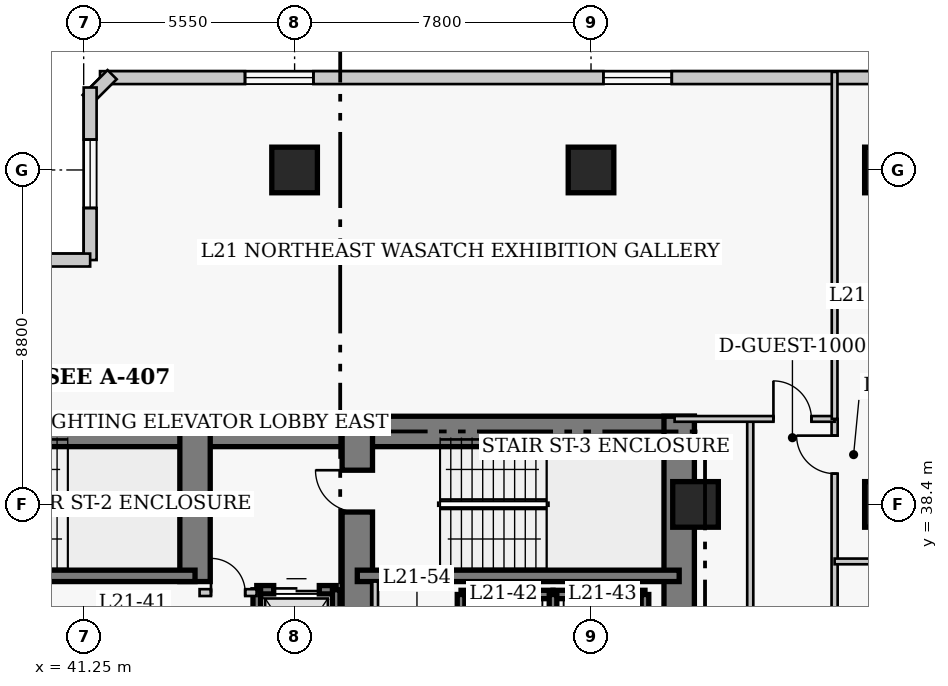
"""IFC4 building model, lengths in metres.
Left out: names, types, materials, properties, quantities, classifications, styles, units other than length and angle.
Written with IfcOpenShell. Run it as: python <this file> out.ifc"""

import sys

from ifc_helpers import new_model, si_unit, direction, frame, frame_2d, origin, origin_2d, place, context, subcontext, project, spatial, rectangle, extrude, element, fill, save


model = new_model("IFC4")
c1 = context("Model", 3, precision=1e-05, world=origin(), true_north=direction((0.0, 1.0)))
c2 = subcontext(c1, "Body", "Model", "MODEL_VIEW")
j1 = project(units=[si_unit("LENGTHUNIT", "METRE"), si_unit("PLANEANGLEUNIT", "RADIAN")], contexts=[c1])
p1 = place(None, origin())
s1 = spatial("IfcSite", under=j1, at=p1, CompositionType="ELEMENT")
p2 = place(p1, origin())
s2 = spatial("IfcBuilding", under=s1, at=p2, CompositionType="ELEMENT")
p3 = place(p2, frame((0.0, 0.0, 88.0)))
s3 = spatial("IfcBuildingStorey", under=s2, at=p3, CompositionType="ELEMENT", Elevation=88.0)
p4 = place(p3, frame((35.85, 40.32, 0.0), z_axis=(0.0, 0.0, 1.0), x_axis=(1.0, 0.0, 0.0)))
e1 = element("IfcWall", 1, at=p4, inside=s3, PredefinedType="SHEAR", context=c2, shape_type="SweptSolid", body=[
    extrude(rectangle(XDim=12.6, YDim=0.8, at=frame_2d((6.3, 0.0))), origin(), (0.0, 0.0, 1.0), 3.8),
])
p5 = place(p3, frame((48.45, 40.32, 0.0), z_axis=(0.0, 0.0, 1.0), x_axis=(1.0, 0.0, 0.0)))
e2 = element("IfcWall", 2, at=p5, inside=s3, PredefinedType="SHEAR", context=c2, shape_type="SweptSolid", body=[
    extrude(rectangle(XDim=8.87, YDim=0.8, at=frame_2d((4.435, 0.0))), origin(), (0.0, 0.0, 1.0), 3.8),
])
p6 = place(p3, frame((56.92, 27.05, 0.0), z_axis=(0.0, 0.0, 1.0), x_axis=(0.0, 1.0, 0.0)))
e3 = element("IfcWall", 3, at=p6, inside=s3, PredefinedType="SHEAR", context=c2, shape_type="SweptSolid", body=[
    extrude(rectangle(XDim=13.67, YDim=0.8, at=frame_2d((6.835, 0.0))), origin(), (0.0, 0.0, 1.0), 3.8),
])
p7 = place(p3, frame((44.18, 36.37, 0.0), z_axis=(0.0, 0.0, 1.0), x_axis=(0.0, 1.0, 0.0)))
e4 = element("IfcWall", 4, at=p7, inside=s3, PredefinedType="SHEAR", context=c2, shape_type="SweptSolid", body=[
    extrude(rectangle(XDim=3.95, YDim=0.8, at=frame_2d((1.975, 0.0))), origin(), (0.0, 0.0, 1.0), 3.8),
])
p8 = place(p3, frame((48.45, 32.35, 0.0), z_axis=(0.0, 0.0, 1.0), x_axis=(0.0, 1.0, 0.0)))
e5 = element("IfcWall", 5, at=p8, inside=s3, PredefinedType="SHEAR", context=c2, shape_type="SweptSolid", body=[
    extrude(rectangle(XDim=7.97, YDim=0.8, at=frame_2d((3.985, 0.0))), origin(), (0.0, 0.0, 1.0), 3.8),
])
p9 = place(p8, frame((5.85, 0.0, 0.0)))
e6 = element("IfcOpeningElement", 6, at=p9, cuts=e5, PredefinedType="OPENING", context=c2, shape_type="SweptSolid", body=[
    extrude(rectangle(XDim=1.1, YDim=2.15, at=frame_2d((0.55, 1.075))), frame((0.0, 0.41, 0.0), z_axis=(0.0, -1.0, 0.0), x_axis=(1.0, 0.0, 0.0)), (0.0, 0.0, 1.0), 0.82),
])
p10 = place(p3, frame((35.85, 36.52, 0.0), z_axis=(0.0, 0.0, 1.0), x_axis=(1.0, 0.0, 0.0)))
e7 = element("IfcWall", 7, at=p10, inside=s3, PredefinedType="SHEAR", context=c2, shape_type="SweptSolid", body=[
    extrude(rectangle(XDim=8.33, YDim=0.3, at=frame_2d((4.165, 0.0))), origin(), (0.0, 0.0, 1.0), 3.8),
])
p11 = place(p3, frame((48.45, 36.52, 0.0), z_axis=(0.0, 0.0, 1.0), x_axis=(1.0, 0.0, 0.0)))
e8 = element("IfcWall", 8, at=p11, inside=s3, PredefinedType="SHEAR", context=c2, shape_type="SweptSolid", body=[
    extrude(rectangle(XDim=8.47, YDim=0.3, at=frame_2d((4.235, 0.0))), origin(), (0.0, 0.0, 1.0), 3.8),
])
for number, where, z_axis, x_axis in (
    (9, (46.8, 47.2, 0.0), (0.0, 0.0, 1.0), (1.0, 0.0, 0.0)),
    (10, (54.6, 47.2, 0.0), (0.0, 0.0, 1.0), (1.0, 0.0, 0.0)),
    (11, (62.4, 38.4, 0.0), (0.0, 0.0, 1.0), (1.0, 0.0, 0.0)),
    (12, (62.4, 47.2, 0.0), (0.0, 0.0, 1.0), (1.0, 0.0, 0.0)),
    (13, (57.35, 38.4, 0.0), (0.0, 0.0, 1.0), (1.0, 0.0, 0.0)),
):
    element("IfcColumn", number, at=place(p3, frame(where, z_axis=z_axis, x_axis=x_axis)), inside=s3, PredefinedType="COLUMN", context=c2, shape_type="SweptSolid", body=[
        extrude(rectangle(XDim=1.2, YDim=1.2, at=origin_2d()), origin(), (0.0, 0.0, 1.0), 3.8),
    ])
p12 = place(p3, frame((69.97, 49.63, 0.0), z_axis=(0.0, 0.0, 1.0), x_axis=(-1.0, 0.0, 0.0)))
e14 = element("IfcWall", 14, at=p12, inside=s3, PredefinedType="SOLIDWALL", context=c2, shape_type="SweptSolid", body=[
    extrude(rectangle(XDim=28.29, YDim=0.34, at=frame_2d((14.145, 0.0))), origin(), (0.0, 0.0, 1.0), 3.54),
])
p13 = place(p12, frame((3.815, 0.0, 0.85)))
e15 = element("IfcOpeningElement", 15, at=p13, cuts=e14, PredefinedType="OPENING", context=c2, shape_type="SweptSolid", body=[
    extrude(rectangle(XDim=1.8, YDim=1.8, at=frame_2d((0.9, 0.9))), frame((0.0, 0.18, 0.0), z_axis=(0.0, -1.0, 0.0), x_axis=(1.0, 0.0, 0.0)), (0.0, 0.0, 1.0), 0.36),
])
p14 = place(p12, frame((13.245, 0.0, 0.85)))
e16 = element("IfcOpeningElement", 16, at=p14, cuts=e14, PredefinedType="OPENING", context=c2, shape_type="SweptSolid", body=[
    extrude(rectangle(XDim=1.8, YDim=1.8, at=frame_2d((0.9, 0.9))), frame((0.0, 0.18, 0.0), z_axis=(0.0, -1.0, 0.0), x_axis=(1.0, 0.0, 0.0)), (0.0, 0.0, 1.0), 0.36),
])
p15 = place(p12, frame((22.675, 0.0, 0.85)))
e17 = element("IfcOpeningElement", 17, at=p15, cuts=e14, PredefinedType="OPENING", context=c2, shape_type="SweptSolid", body=[
    extrude(rectangle(XDim=1.8, YDim=1.8, at=frame_2d((0.9, 0.9))), frame((0.0, 0.18, 0.0), z_axis=(0.0, -1.0, 0.0), x_axis=(1.0, 0.0, 0.0)), (0.0, 0.0, 1.0), 0.36),
])
p16 = place(p3, frame((41.999, 49.708, 0.0), z_axis=(0.0, 0.0, 1.0), x_axis=(-0.707238225886, -0.706975312048, 0.0)))
e18 = element("IfcWall", 18, at=p16, inside=s3, PredefinedType="SOLIDWALL", context=c2, shape_type="SweptSolid", body=[
    extrude(rectangle(XDim=0.929, YDim=0.34, at=frame_2d((0.464, 0.0))), origin(), (0.0, 0.0, 1.0), 3.54),
])
p17 = place(p3, frame((41.42, 49.37, 0.0), z_axis=(0.0, 0.0, 1.0), x_axis=(0.0, -1.0, 0.0)))
e19 = element("IfcWall", 19, at=p17, inside=s3, PredefinedType="SOLIDWALL", context=c2, shape_type="SweptSolid", body=[
    extrude(rectangle(XDim=4.54, YDim=0.34, at=frame_2d((2.27, 0.0))), origin(), (0.0, 0.0, 1.0), 3.54),
])
p18 = place(p17, frame((1.37, 0.0, 0.85)))
e20 = element("IfcOpeningElement", 20, at=p18, cuts=e19, PredefinedType="OPENING", context=c2, shape_type="SweptSolid", body=[
    extrude(rectangle(XDim=1.8, YDim=1.8, at=frame_2d((0.9, 0.9))), frame((0.0, 0.18, 0.0), z_axis=(0.0, -1.0, 0.0), x_axis=(1.0, 0.0, 0.0)), (0.0, 0.0, 1.0), 0.36),
])
p19 = place(p3, frame((41.42, 44.83, 0.0), z_axis=(0.0, 0.0, 1.0), x_axis=(-1.0, 0.0, 0.0)))
e21 = element("IfcWall", 21, at=p19, inside=s3, PredefinedType="SOLIDWALL", context=c2, shape_type="SweptSolid", body=[
    extrude(rectangle(XDim=4.84, YDim=0.34, at=frame_2d((2.42, 0.0))), origin(), (0.0, 0.0, 1.0), 3.54),
])
p20 = place(p19, frame((1.52, 0.0, 0.85)))
e22 = element("IfcOpeningElement", 22, at=p20, cuts=e21, PredefinedType="OPENING", context=c2, shape_type="SweptSolid", body=[
    extrude(rectangle(XDim=1.8, YDim=1.8, at=frame_2d((0.9, 0.9))), frame((0.0, 0.18, 0.0), z_axis=(0.0, -1.0, 0.0), x_axis=(1.0, 0.0, 0.0)), (0.0, 0.0, 1.0), 0.36),
])
p21 = place(p3, frame((51.18, 36.03, 0.0), z_axis=(0.0, 0.0, 1.0), x_axis=(1.0, 0.0, 0.0)))
e23 = element("IfcWall", 23, at=p21, inside=s3, PredefinedType="SHEAR", context=c2, shape_type="SweptSolid", body=[
    extrude(rectangle(XDim=2.42, YDim=0.22, at=frame_2d((1.21, 0.0))), origin(), (0.0, 0.0, 1.0), 3.8),
])
p22 = place(p3, frame((51.18, 33.17, 0.0), z_axis=(0.0, 0.0, 1.0), x_axis=(0.0, 1.0, 0.0)))
e24 = element("IfcWall", 24, at=p22, inside=s3, PredefinedType="SHEAR", context=c2, shape_type="SweptSolid", body=[
    extrude(rectangle(XDim=2.86, YDim=0.2, at=frame_2d((1.43, 0.0))), origin(), (0.0, 0.0, 1.0), 3.8),
])
p23 = place(p3, frame((53.6, 36.03, 0.0), z_axis=(0.0, 0.0, 1.0), x_axis=(1.0, 0.0, 0.0)))
e25 = element("IfcWall", 25, at=p23, inside=s3, PredefinedType="SHEAR", context=c2, shape_type="SweptSolid", body=[
    extrude(rectangle(XDim=2.42, YDim=0.22, at=frame_2d((1.21, 0.0))), origin(), (0.0, 0.0, 1.0), 3.8),
])
for number, where, z_axis, x_axis in (
    (26, (53.6, 33.17, 0.0), (0.0, 0.0, 1.0), (0.0, 1.0, 0.0)),
    (27, (56.02, 33.17, 0.0), (0.0, 0.0, 1.0), (0.0, 1.0, 0.0)),
):
    element("IfcWall", number, at=place(p3, frame(where, z_axis=z_axis, x_axis=x_axis)), inside=s3, PredefinedType="SHEAR", context=c2, shape_type="SweptSolid", body=[
        extrude(rectangle(XDim=2.86, YDim=0.2, at=frame_2d((1.43, 0.0))), origin(), (0.0, 0.0, 1.0), 3.8),
    ])
p24 = place(p3, frame((45.805, 36.155, 0.0), z_axis=(0.0, 0.0, 1.0), x_axis=(1.0, 0.0, 0.0)))
e28 = element("IfcWall", 28, at=p24, inside=s3, PredefinedType="SHEAR", context=c2, shape_type="SweptSolid", body=[
    extrude(rectangle(XDim=2.09, YDim=0.22, at=frame_2d((1.045, 0.0))), origin(), (0.0, 0.0, 1.0), 3.8),
])
p25 = place(p24, frame((0.445, 0.0, 0.0)))
e29 = element("IfcOpeningElement", 29, at=p25, cuts=e28, PredefinedType="OPENING", context=c2, shape_type="SweptSolid", body=[
    extrude(rectangle(XDim=1.2, YDim=2.15, at=frame_2d((0.6, 1.075))), frame((0.0, 0.12, 0.0), z_axis=(0.0, -1.0, 0.0), x_axis=(1.0, 0.0, 0.0)), (0.0, 0.0, 1.0), 0.24),
])
p26 = place(p3, frame((45.805, 32.65, 0.0), z_axis=(0.0, 0.0, 1.0), x_axis=(0.0, 1.0, 0.0)))
e30 = element("IfcWall", 30, at=p26, inside=s3, PredefinedType="SHEAR", context=c2, shape_type="SweptSolid", body=[
    extrude(rectangle(XDim=3.505, YDim=0.2, at=frame_2d((1.752, 0.0))), origin(), (0.0, 0.0, 1.0), 3.8),
])
p27 = place(p3, frame((47.895, 33.245, 0.0), z_axis=(0.0, 0.0, 1.0), x_axis=(0.0, 1.0, 0.0)))
e31 = element("IfcWall", 31, at=p27, inside=s3, PredefinedType="SHEAR", context=c2, shape_type="SweptSolid", body=[
    extrude(rectangle(XDim=2.91, YDim=0.2, at=frame_2d((1.455, 0.0))), origin(), (0.0, 0.0, 1.0), 3.8),
])
p28 = place(p3, frame((44.3, 36.08, 0.0), z_axis=(0.0, 0.0, 1.0), x_axis=(1.0, 0.0, 0.0)))
e32 = element("IfcWall", 32, at=p28, inside=s3, PredefinedType="PARTITIONING", context=c2, shape_type="SweptSolid", body=[
    extrude(rectangle(XDim=1.5, YDim=0.18, at=frame_2d((0.75, 0.0))), origin(), (0.0, 0.0, 1.0), 3.54),
])
p29 = place(p28, frame((0.3, 0.0, 0.0)))
e33 = element("IfcOpeningElement", 33, at=p29, cuts=e32, PredefinedType="OPENING", context=c2, shape_type="SweptSolid", body=[
    extrude(rectangle(XDim=0.9, YDim=2.15, at=frame_2d((0.45, 1.075))), frame((0.0, 0.1, 0.0), z_axis=(0.0, -1.0, 0.0), x_axis=(1.0, 0.0, 0.0)), (0.0, 0.0, 1.0), 0.2),
])
p30 = place(p3, frame((48.92, 32.75, 0.0), z_axis=(0.0, 0.0, 1.0), x_axis=(0.0, 1.0, 0.0)))
e34 = element("IfcWall", 34, at=p30, inside=s3, PredefinedType="PARTITIONING", context=c2, shape_type="SweptSolid", body=[
    extrude(rectangle(XDim=3.62, YDim=0.15, at=frame_2d((1.81, 0.0))), origin(), (0.0, 0.0, 1.0), 3.54),
])
p31 = place(p3, frame((61.01, 11.85, 0.0), z_axis=(0.0, 0.0, 1.0), x_axis=(0.0, 1.0, 0.0)))
e35 = element("IfcWall", 35, at=p31, inside=s3, PredefinedType="PARTITIONING", context=c2, shape_type="SweptSolid", body=[
    extrude(rectangle(XDim=28.8, YDim=0.16, at=frame_2d((14.4, 0.0))), origin(), (0.0, 0.0, 1.0), 3.54),
])
p32 = place(p31, frame((3.6, 0.0, 0.0)))
e36 = element("IfcOpeningElement", 36, at=p32, cuts=e35, PredefinedType="OPENING", context=c2, shape_type="SweptSolid", body=[
    extrude(rectangle(XDim=0.95, YDim=2.1, at=frame_2d((0.475, 1.05))), frame((0.0, 0.09, 0.0), z_axis=(0.0, -1.0, 0.0), x_axis=(1.0, 0.0, 0.0)), (0.0, 0.0, 1.0), 0.18),
])
p33 = place(p31, frame((10.019, 0.0, 0.0)))
e37 = element("IfcOpeningElement", 37, at=p33, cuts=e35, PredefinedType="OPENING", context=c2, shape_type="SweptSolid", body=[
    extrude(rectangle(XDim=0.95, YDim=2.1, at=frame_2d((0.475, 1.05))), frame((0.0, 0.09, 0.0), z_axis=(0.0, -1.0, 0.0), x_axis=(1.0, 0.0, 0.0)), (0.0, 0.0, 1.0), 0.18),
])
p34 = place(p31, frame((27.36, 0.0, 0.0)))
e38 = element("IfcOpeningElement", 38, at=p34, cuts=e35, PredefinedType="OPENING", context=c2, shape_type="SweptSolid", body=[
    extrude(rectangle(XDim=1.0, YDim=2.15, at=frame_2d((0.5, 1.075))), frame((0.0, 0.09, 0.0), z_axis=(0.0, -1.0, 0.0), x_axis=(1.0, 0.0, 0.0)), (0.0, 0.0, 1.0), 0.18),
])
p35 = place(p3, frame((58.79, 26.11, 0.0), z_axis=(0.0, 0.0, 1.0), x_axis=(0.0, 1.0, 0.0)))
e39 = element("IfcWall", 39, at=p35, inside=s3, PredefinedType="PARTITIONING", context=c2, shape_type="SweptSolid", body=[
    extrude(rectangle(XDim=14.54, YDim=0.16, at=frame_2d((7.27, 0.0))), origin(), (0.0, 0.0, 1.0), 3.54),
])
p36 = place(p3, frame((56.8, 40.65, 0.0), z_axis=(0.0, 0.0, 1.0), x_axis=(1.0, 0.0, 0.0)))
e40 = element("IfcWall", 40, at=p36, inside=s3, PredefinedType="PARTITIONING", context=c2, shape_type="SweptSolid", body=[
    extrude(rectangle(XDim=4.21, YDim=0.15, at=frame_2d((2.105, 0.0))), origin(), (0.0, 0.0, 1.0), 3.54),
])
p37 = place(p36, frame((2.6, 0.0, 0.0)))
e41 = element("IfcOpeningElement", 41, at=p37, cuts=e40, PredefinedType="OPENING", context=c2, shape_type="SweptSolid", body=[
    extrude(rectangle(XDim=1.0, YDim=2.15, at=frame_2d((0.5, 1.075))), frame((0.0, 0.085, 0.0), z_axis=(0.0, -1.0, 0.0), x_axis=(1.0, 0.0, 0.0)), (0.0, 0.0, 1.0), 0.17),
])
p38 = place(p3, frame((61.01, 40.65, 0.0), z_axis=(0.0, 0.0, 1.0), x_axis=(0.0, 1.0, 0.0)))
e42 = element("IfcWall", 42, at=p38, inside=s3, PredefinedType="PARTITIONING", context=c2, shape_type="SweptSolid", body=[
    extrude(rectangle(XDim=9.13, YDim=0.15, at=frame_2d((4.565, 0.0))), origin(), (0.0, 0.0, 1.0), 3.54),
])
p39 = place(p3, frame((61.01, 36.9, 0.0), z_axis=(0.0, 0.0, 1.0), x_axis=(1.0, 0.0, 0.0)))
e43 = element("IfcWall", 43, at=p39, inside=s3, PredefinedType="PARTITIONING", context=c2, shape_type="SweptSolid", body=[
    extrude(rectangle(XDim=4.09, YDim=0.15, at=frame_2d((2.045, 0.0))), origin(), (0.0, 0.0, 1.0), 3.54),
])
p40 = place(p14, origin())
e44 = element("IfcWindow", 44, at=p40, inside=s3, PartitioningType="SINGLE_PANEL", PredefinedType="WINDOW", context=c2, shape_type="SweptSolid", body=[
    extrude(rectangle(XDim=1.8, YDim=1.8, at=frame_2d((0.9, 0.9))), frame((0.0, 0.03, 0.0), z_axis=(0.0, -1.0, 0.0), x_axis=(1.0, 0.0, 0.0)), (0.0, 0.0, 1.0), 0.06),
])
fill(e16, e44)
p41 = place(p15, origin())
e45 = element("IfcWindow", 45, at=p41, inside=s3, PartitioningType="SINGLE_PANEL", PredefinedType="WINDOW", context=c2, shape_type="SweptSolid", body=[
    extrude(rectangle(XDim=1.8, YDim=1.8, at=frame_2d((0.9, 0.9))), frame((0.0, 0.03, 0.0), z_axis=(0.0, -1.0, 0.0), x_axis=(1.0, 0.0, 0.0)), (0.0, 0.0, 1.0), 0.06),
])
fill(e17, e45)
p42 = place(p18, origin())
e46 = element("IfcWindow", 46, at=p42, inside=s3, PartitioningType="SINGLE_PANEL", PredefinedType="WINDOW", context=c2, shape_type="SweptSolid", body=[
    extrude(rectangle(XDim=1.8, YDim=1.8, at=frame_2d((0.9, 0.9))), frame((0.0, 0.03, 0.0), z_axis=(0.0, -1.0, 0.0), x_axis=(1.0, 0.0, 0.0)), (0.0, 0.0, 1.0), 0.06),
])
fill(e20, e46)
p43 = place(p25, origin())
e47 = element("IfcDoor", 47, at=p43, inside=s3, OperationType="DOUBLE_DOOR_SLIDING", PredefinedType="DOOR", context=c2, shape_type="SweptSolid", body=[
    extrude(rectangle(XDim=1.2, YDim=2.15, at=frame_2d((0.6, 1.075))), frame((0.0, 0.025, 0.0), z_axis=(0.0, -1.0, 0.0), x_axis=(1.0, 0.0, 0.0)), (0.0, 0.0, 1.0), 0.05),
])
fill(e29, e47)
p44 = place(p29, origin())
e48 = element("IfcDoor", 48, at=p44, inside=s3, OperationType="SINGLE_SWING_LEFT", PredefinedType="DOOR", context=c2, shape_type="SweptSolid", body=[
    extrude(rectangle(XDim=0.9, YDim=2.15, at=frame_2d((0.45, 1.075))), frame((0.0, 0.025, 0.0), z_axis=(0.0, -1.0, 0.0), x_axis=(1.0, 0.0, 0.0)), (0.0, 0.0, 1.0), 0.05),
])
fill(e33, e48)
p45 = place(p37, origin())
e49 = element("IfcDoor", 49, at=p45, inside=s3, OperationType="SINGLE_SWING_LEFT", PredefinedType="DOOR", context=c2, shape_type="SweptSolid", body=[
    extrude(rectangle(XDim=1.0, YDim=2.15, at=frame_2d((0.5, 1.075))), frame((0.0, 0.025, 0.0), z_axis=(0.0, -1.0, 0.0), x_axis=(1.0, 0.0, 0.0)), (0.0, 0.0, 1.0), 0.05),
])
fill(e41, e49)
p46 = place(p34, origin())
e50 = element("IfcDoor", 50, at=p46, inside=s3, OperationType="SINGLE_SWING_RIGHT", PredefinedType="DOOR", context=c2, shape_type="SweptSolid", body=[
    extrude(rectangle(XDim=1.0, YDim=2.15, at=frame_2d((0.5, 1.075))), frame((0.0, 0.025, 0.0), z_axis=(0.0, -1.0, 0.0), x_axis=(1.0, 0.0, 0.0)), (0.0, 0.0, 1.0), 0.05),
])
fill(e38, e50)
p47 = place(p9, origin())
e51 = element("IfcDoor", 51, at=p47, inside=s3, OperationType="SINGLE_SWING_RIGHT", PredefinedType="DOOR", context=c2, shape_type="SweptSolid", body=[
    extrude(rectangle(XDim=1.1, YDim=2.15, at=frame_2d((0.55, 1.075))), frame((0.0, 0.025, 0.0), z_axis=(0.0, -1.0, 0.0), x_axis=(1.0, 0.0, 0.0)), (0.0, 0.0, 1.0), 0.05),
])
fill(e6, e51)
save(model, sys.argv[1])
